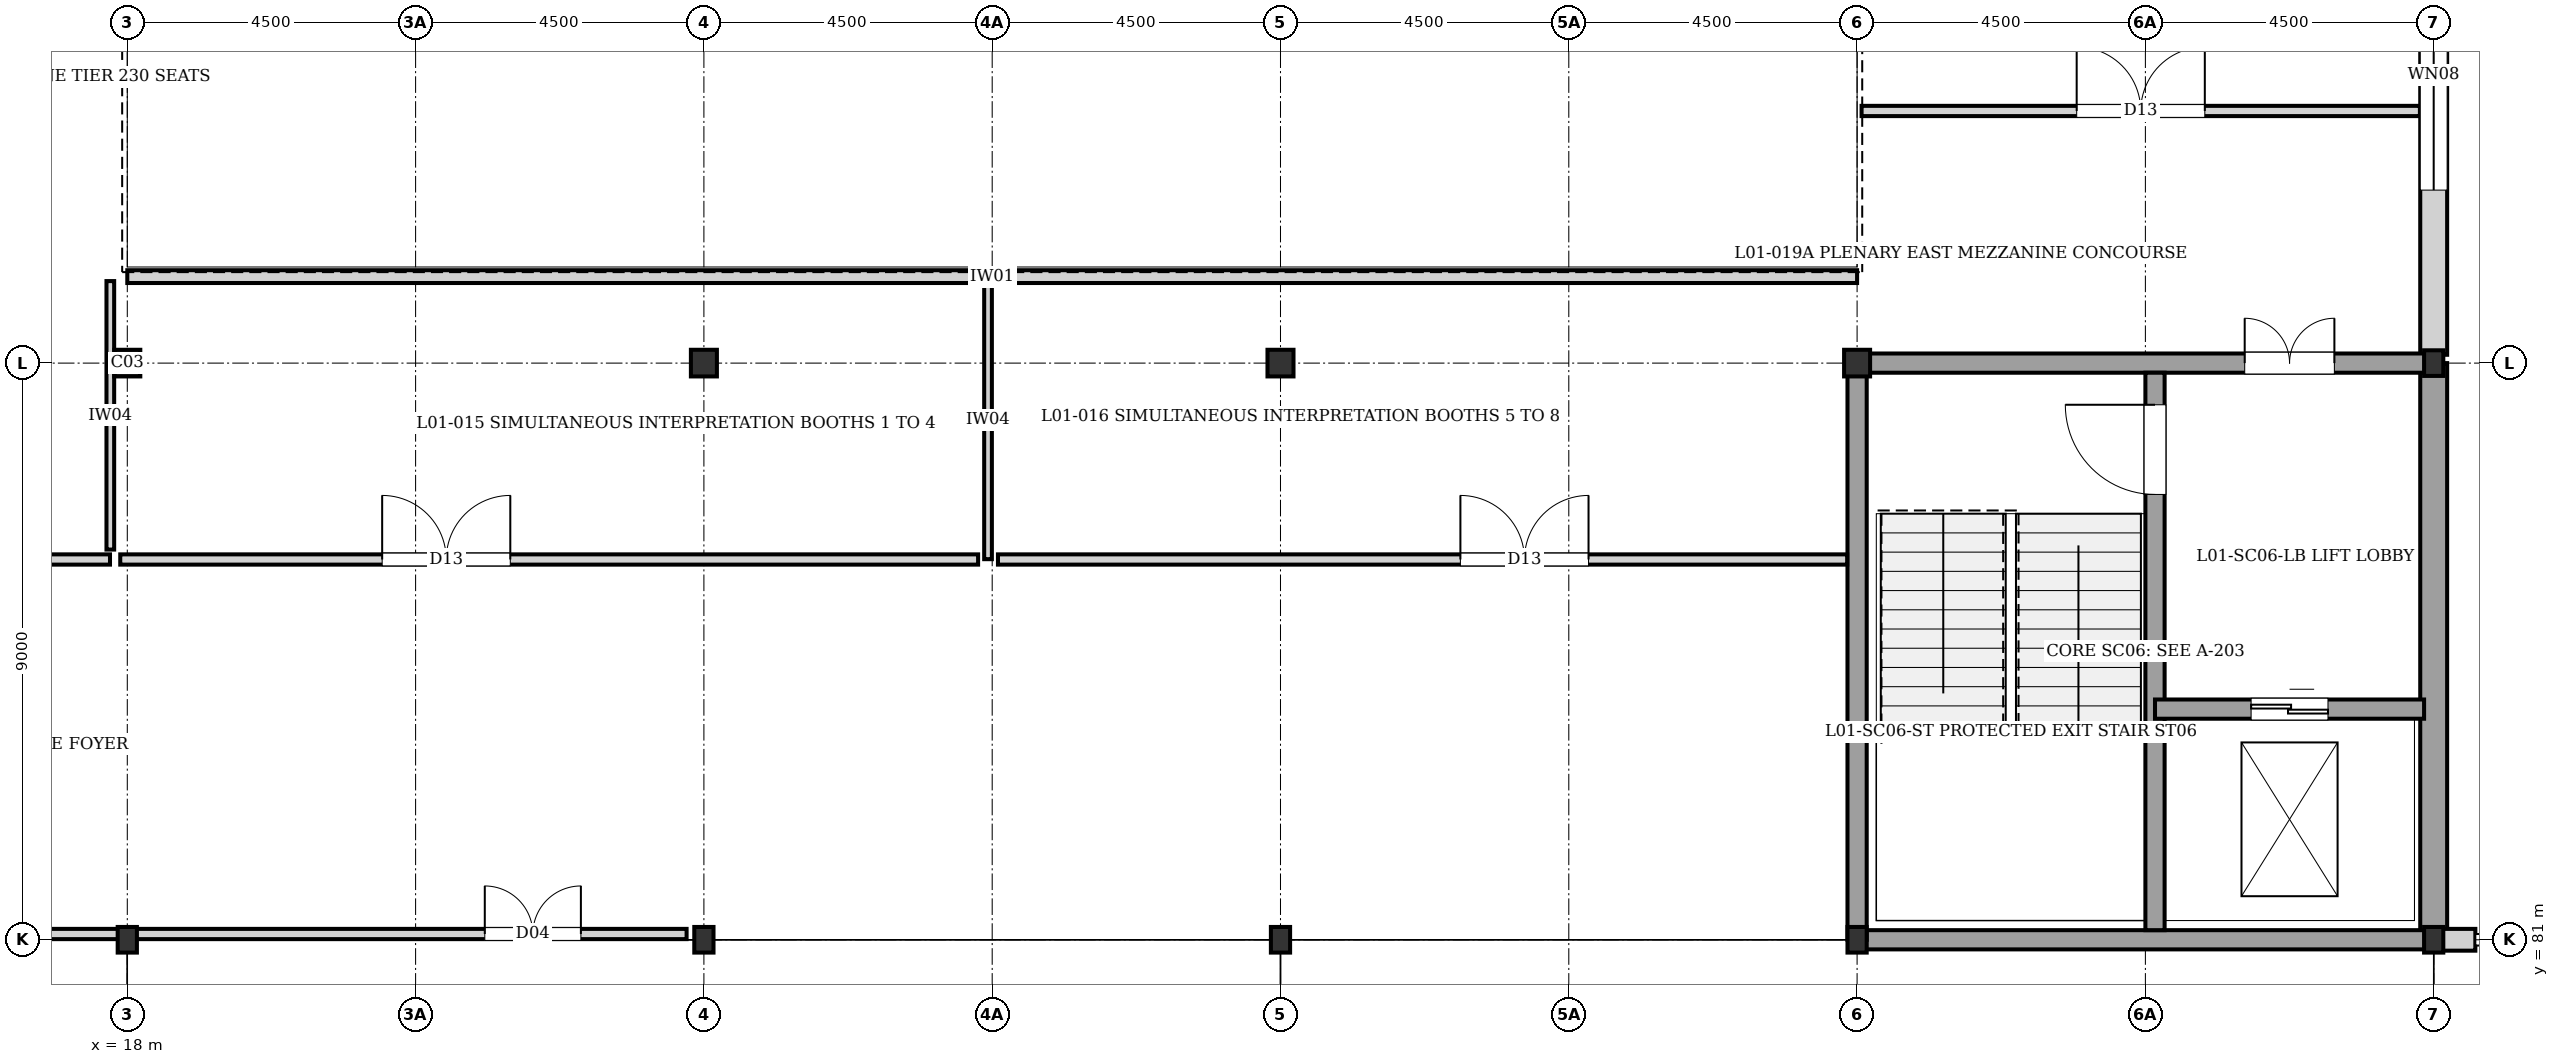
"""IFC4 building model, lengths in metres.
Left out: names, types, materials, properties, quantities, classifications, styles, units other than length and angle.
Written with IfcOpenShell. Run it as: python <this file> out.ifc"""

import sys

from ifc_helpers import new_model, si_unit, direction, frame, frame_2d, origin, origin_2d, place, context, subcontext, project, spatial, rectangle, i_section, extrude, element, fill, save


model = new_model("IFC4")
c1 = context("Model", 3, precision=1e-05, world=origin(), true_north=direction((0.0, 1.0)))
c2 = subcontext(c1, "Body", "Model", "MODEL_VIEW")
j1 = project(units=[si_unit("LENGTHUNIT", "METRE"), si_unit("PLANEANGLEUNIT", "RADIAN")], contexts=[c1])
p1 = place(None, origin())
s1 = spatial("IfcSite", under=j1, at=p1, CompositionType="ELEMENT")
p2 = place(p1, origin())
s2 = spatial("IfcBuilding", under=s1, at=p2, CompositionType="ELEMENT")
p3 = place(p2, frame((0.0, 0.0, 4.32)))
s3 = spatial("IfcBuildingStorey", under=s2, at=p3, CompositionType="ELEMENT", Elevation=4.32)
p4 = place(p3, frame((18.0, 81.0, 0.0), z_axis=(0.0, 0.0, 1.0), x_axis=(1.0, 0.0, 0.0)))
e1 = element("IfcColumn", 1, at=p4, inside=s3, PredefinedType="COLUMN", context=c2, shape_type="SweptSolid", body=[
    extrude(i_section(OverallWidth=0.3, OverallDepth=0.4, WebThickness=0.013, FlangeThickness=0.024, at=origin_2d()), origin(), (0.0, 0.0, 1.0), 3.84),
])
p5 = place(p3, frame((18.0, 90.0, 0.0), z_axis=(0.0, 0.0, 1.0), x_axis=(1.0, 0.0, 0.0)))
e2 = element("IfcColumn", 2, at=p5, inside=s3, PredefinedType="COLUMN", context=c2, shape_type="SweptSolid", body=[
    extrude(i_section(OverallWidth=0.406, OverallDepth=0.416, WebThickness=0.022, FlangeThickness=0.038, at=origin_2d()), origin(), (0.0, 0.0, 1.0), 3.84),
])
p6 = place(p3, frame((27.0, 81.0, 0.0), z_axis=(0.0, 0.0, 1.0), x_axis=(1.0, 0.0, 0.0)))
e3 = element("IfcColumn", 3, at=p6, inside=s3, PredefinedType="COLUMN", context=c2, shape_type="SweptSolid", body=[
    extrude(i_section(OverallWidth=0.3, OverallDepth=0.4, WebThickness=0.013, FlangeThickness=0.024, at=origin_2d()), origin(), (0.0, 0.0, 1.0), 3.84),
])
p7 = place(p3, frame((27.0, 90.0, 0.0), z_axis=(0.0, 0.0, 1.0), x_axis=(1.0, 0.0, 0.0)))
e4 = element("IfcColumn", 4, at=p7, inside=s3, PredefinedType="COLUMN", context=c2, shape_type="SweptSolid", body=[
    extrude(i_section(OverallWidth=0.406, OverallDepth=0.416, WebThickness=0.022, FlangeThickness=0.038, at=origin_2d()), origin(), (0.0, 0.0, 1.0), 3.84),
])
p8 = place(p3, frame((36.0, 81.0, 0.0), z_axis=(0.0, 0.0, 1.0), x_axis=(1.0, 0.0, 0.0)))
e5 = element("IfcColumn", 5, at=p8, inside=s3, PredefinedType="COLUMN", context=c2, shape_type="SweptSolid", body=[
    extrude(i_section(OverallWidth=0.3, OverallDepth=0.4, WebThickness=0.013, FlangeThickness=0.024, at=origin_2d()), origin(), (0.0, 0.0, 1.0), 3.84),
])
p9 = place(p3, frame((36.0, 90.0, 0.0), z_axis=(0.0, 0.0, 1.0), x_axis=(1.0, 0.0, 0.0)))
e6 = element("IfcColumn", 6, at=p9, inside=s3, PredefinedType="COLUMN", context=c2, shape_type="SweptSolid", body=[
    extrude(i_section(OverallWidth=0.406, OverallDepth=0.416, WebThickness=0.022, FlangeThickness=0.038, at=origin_2d()), origin(), (0.0, 0.0, 1.0), 3.84),
])
p10 = place(p3, frame((45.0, 81.0, 0.0), z_axis=(0.0, 0.0, 1.0), x_axis=(1.0, 0.0, 0.0)))
e7 = element("IfcColumn", 7, at=p10, inside=s3, PredefinedType="COLUMN", context=c2, shape_type="SweptSolid", body=[
    extrude(i_section(OverallWidth=0.3, OverallDepth=0.4, WebThickness=0.013, FlangeThickness=0.024, at=origin_2d()), origin(), (0.0, 0.0, 1.0), 3.84),
])
p11 = place(p3, frame((45.0, 90.0, 0.0), z_axis=(0.0, 0.0, 1.0), x_axis=(1.0, 0.0, 0.0)))
e8 = element("IfcColumn", 8, at=p11, inside=s3, PredefinedType="COLUMN", context=c2, shape_type="SweptSolid", body=[
    extrude(i_section(OverallWidth=0.406, OverallDepth=0.416, WebThickness=0.022, FlangeThickness=0.038, at=origin_2d()), origin(), (0.0, 0.0, 1.0), 3.84),
])
for number, where, z_axis, x_axis in (
    (9, (54.0, 81.0, 0.0), (0.0, 0.0, 1.0), (1.0, 0.0, 0.0)),
    (10, (54.0, 90.0, 0.0), (0.0, 0.0, 1.0), (1.0, 0.0, 0.0)),
):
    element("IfcColumn", number, at=place(p3, frame(where, z_axis=z_axis, x_axis=x_axis)), inside=s3, PredefinedType="COLUMN", context=c2, shape_type="SweptSolid", body=[
        extrude(i_section(OverallWidth=0.3, OverallDepth=0.4, WebThickness=0.013, FlangeThickness=0.024, at=origin_2d()), origin(), (0.0, 0.0, 1.0), 3.84),
    ])
p12 = place(p3, frame((54.0, 99.0, 0.0), z_axis=(0.0, 0.0, 1.0), x_axis=(0.0, -1.0, 0.0)))
e11 = element("IfcWall", 11, at=p12, inside=s3, PredefinedType="SOLIDWALL", context=c2, shape_type="SweptSolid", body=[
    extrude(rectangle(XDim=8.87, YDim=0.42, at=frame_2d((4.435, 0.0))), origin(), (0.0, 0.0, 1.0), 3.22),
])
p13 = place(p12, frame((2.7, 0.0, 0.4)))
e12 = element("IfcOpeningElement", 12, at=p13, cuts=e11, PredefinedType="OPENING", context=c2, shape_type="SweptSolid", body=[
    extrude(rectangle(XDim=3.6, YDim=2.2, at=frame_2d((1.8, 1.1))), frame((0.0, 0.22, 0.0), z_axis=(0.0, -1.0, 0.0), x_axis=(1.0, 0.0, 0.0)), (0.0, 0.0, 1.0), 0.44),
])
p14 = place(p3, frame((54.0, 90.0, 0.0), z_axis=(0.0, 0.0, 1.0), x_axis=(0.0, -1.0, 0.0)))
e13 = element("IfcWall", 13, at=p14, inside=s3, PredefinedType="SOLIDWALL", context=c2, shape_type="SweptSolid", body=[
    extrude(rectangle(XDim=9.0, YDim=0.42, at=frame_2d((4.5, 0.0))), origin(), (0.0, 0.0, 1.0), 3.6),
])
p15 = place(p3, frame((54.13, 81.0, 0.0), z_axis=(0.0, 0.0, 1.0), x_axis=(1.0, 0.0, 0.0)))
e14 = element("IfcWall", 14, at=p15, inside=s3, PredefinedType="SOLIDWALL", context=c2, shape_type="SweptSolid", body=[
    extrude(rectangle(XDim=0.52, YDim=0.34, at=frame_2d((0.26, 0.0))), origin(), (0.0, 0.0, 1.0), 3.28),
])
p16 = place(p3, frame((45.0, 81.0, 0.0), z_axis=(0.0, 0.0, 1.0), x_axis=(1.0, 0.0, 0.0)))
e15 = element("IfcWall", 15, at=p16, inside=s3, PredefinedType="SHEAR", context=c2, shape_type="SweptSolid", body=[
    extrude(rectangle(XDim=9.0, YDim=0.3, at=frame_2d((4.5, 0.0))), origin(), (0.0, 0.0, 1.0), 3.6),
])
p17 = place(p3, frame((45.0, 90.0, 0.0), z_axis=(0.0, 0.0, 1.0), x_axis=(1.0, 0.0, 0.0)))
e16 = element("IfcWall", 16, at=p17, inside=s3, PredefinedType="SHEAR", context=c2, shape_type="SweptSolid", body=[
    extrude(rectangle(XDim=9.0, YDim=0.3, at=frame_2d((4.5, 0.0))), origin(), (0.0, 0.0, 1.0), 3.6),
])
p18 = place(p17, frame((6.05, 0.0, 0.0)))
e17 = element("IfcOpeningElement", 17, at=p18, cuts=e16, PredefinedType="OPENING", context=c2, shape_type="SweptSolid", body=[
    extrude(rectangle(XDim=1.4, YDim=2.02, at=frame_2d((0.7, 1.01))), frame((0.0, 0.16, 0.0), z_axis=(0.0, -1.0, 0.0), x_axis=(1.0, 0.0, 0.0)), (0.0, 0.0, 1.0), 0.32),
])
p19 = place(p3, frame((45.0, 81.0, 0.0), z_axis=(0.0, 0.0, 1.0), x_axis=(0.0, 1.0, 0.0)))
e18 = element("IfcWall", 18, at=p19, inside=s3, PredefinedType="SHEAR", context=c2, shape_type="SweptSolid", body=[
    extrude(rectangle(XDim=9.0, YDim=0.3, at=frame_2d((4.5, 0.0))), origin(), (0.0, 0.0, 1.0), 3.6),
])
p20 = place(p3, frame((49.65, 81.15, 0.0), z_axis=(0.0, 0.0, 1.0), x_axis=(0.0, 1.0, 0.0)))
e19 = element("IfcWall", 19, at=p20, inside=s3, PredefinedType="SHEAR", context=c2, shape_type="SweptSolid", body=[
    extrude(rectangle(XDim=8.7, YDim=0.3, at=frame_2d((4.35, 0.0))), origin(), (0.0, 0.0, 1.0), 3.6),
])
p21 = place(p20, frame((6.8, 0.0, 0.0)))
e20 = element("IfcOpeningElement", 20, at=p21, cuts=e19, PredefinedType="OPENING", context=c2, shape_type="SweptSolid", body=[
    extrude(rectangle(XDim=1.4, YDim=2.02, at=frame_2d((0.7, 1.01))), frame((0.0, 0.16, 0.0), z_axis=(0.0, -1.0, 0.0), x_axis=(1.0, 0.0, 0.0)), (0.0, 0.0, 1.0), 0.32),
])
p22 = place(p3, frame((49.65, 84.6, 0.0), z_axis=(0.0, 0.0, 1.0), x_axis=(1.0, 0.0, 0.0)))
e21 = element("IfcWall", 21, at=p22, inside=s3, PredefinedType="SHEAR", context=c2, shape_type="SweptSolid", body=[
    extrude(rectangle(XDim=4.2, YDim=0.3, at=frame_2d((2.1, 0.0))), origin(), (0.0, 0.0, 1.0), 3.6),
])
p23 = place(p22, frame((1.5, 0.0, 0.0)))
e22 = element("IfcOpeningElement", 22, at=p23, cuts=e21, PredefinedType="OPENING", context=c2, shape_type="SweptSolid", body=[
    extrude(rectangle(XDim=1.2, YDim=2.2, at=frame_2d((0.6, 1.1))), frame((0.0, 0.16, 0.0), z_axis=(0.0, -1.0, 0.0), x_axis=(1.0, 0.0, 0.0)), (0.0, 0.0, 1.0), 0.32),
])
p24 = place(p3, frame((11.94, 86.935, 0.0), z_axis=(0.0, 0.0, 1.0), x_axis=(1.0, 0.0, 0.0)))
e23 = element("IfcWall", 23, at=p24, inside=s3, PredefinedType="PARTITIONING", context=c2, shape_type="SweptSolid", body=[
    extrude(rectangle(XDim=5.79, YDim=0.16, at=frame_2d((2.895, 0.0))), origin(), (0.0, 0.0, 1.0), 3.6),
])
p25 = place(p3, frame((17.735, 87.09, 0.0), z_axis=(0.0, 0.0, 1.0), x_axis=(0.0, 1.0, 0.0)))
e24 = element("IfcWall", 24, at=p25, inside=s3, PredefinedType="PARTITIONING", context=c2, shape_type="SweptSolid", body=[
    extrude(rectangle(XDim=4.19, YDim=0.12, at=frame_2d((2.095, 0.0))), origin(), (0.0, 0.0, 1.0), 3.6),
])
p26 = place(p3, frame((31.435, 86.94, 0.0), z_axis=(0.0, 0.0, 1.0), x_axis=(0.0, 1.0, 0.0)))
e25 = element("IfcWall", 25, at=p26, inside=s3, PredefinedType="PARTITIONING", context=c2, shape_type="SweptSolid", body=[
    extrude(rectangle(XDim=4.34, YDim=0.12, at=frame_2d((2.17, 0.0))), origin(), (0.0, 0.0, 1.0), 3.6),
])
p27 = place(p3, frame((17.89, 86.935, 0.0), z_axis=(0.0, 0.0, 1.0), x_axis=(1.0, 0.0, 0.0)))
e26 = element("IfcWall", 26, at=p27, inside=s3, PredefinedType="PARTITIONING", context=c2, shape_type="SweptSolid", body=[
    extrude(rectangle(XDim=13.39, YDim=0.16, at=frame_2d((6.695, 0.0))), origin(), (0.0, 0.0, 1.0), 3.6),
])
p28 = place(p27, frame((4.088, 0.0, 0.0)))
e27 = element("IfcOpeningElement", 27, at=p28, cuts=e26, PredefinedType="OPENING", context=c2, shape_type="SweptSolid", body=[
    extrude(rectangle(XDim=2.0, YDim=2.35, at=frame_2d((1.0, 1.175))), frame((0.0, 0.09, 0.0), z_axis=(0.0, -1.0, 0.0), x_axis=(1.0, 0.0, 0.0)), (0.0, 0.0, 1.0), 0.18),
])
p29 = place(p3, frame((31.59, 86.935, 0.0), z_axis=(0.0, 0.0, 1.0), x_axis=(1.0, 0.0, 0.0)))
e28 = element("IfcWall", 28, at=p29, inside=s3, PredefinedType="PARTITIONING", context=c2, shape_type="SweptSolid", body=[
    extrude(rectangle(XDim=13.255, YDim=0.16, at=frame_2d((6.627, 0.0))), origin(), (0.0, 0.0, 1.0), 3.6),
])
p30 = place(p29, frame((7.218, 0.0, 0.0)))
e29 = element("IfcOpeningElement", 29, at=p30, cuts=e28, PredefinedType="OPENING", context=c2, shape_type="SweptSolid", body=[
    extrude(rectangle(XDim=2.0, YDim=2.35, at=frame_2d((1.0, 1.175))), frame((0.0, 0.09, 0.0), z_axis=(0.0, -1.0, 0.0), x_axis=(1.0, 0.0, 0.0)), (0.0, 0.0, 1.0), 0.18),
])
p31 = place(p3, frame((9.155, 81.09, 0.0), z_axis=(0.0, 0.0, 1.0), x_axis=(1.0, 0.0, 0.0)))
e30 = element("IfcWall", 30, at=p31, inside=s3, PredefinedType="PARTITIONING", context=c2, shape_type="SweptSolid", body=[
    extrude(rectangle(XDim=8.825, YDim=0.16, at=frame_2d((4.413, 0.0))), origin(), (0.0, 0.0, 1.0), 3.35),
])
p32 = place(p3, frame((45.07, 93.935, 0.0), z_axis=(0.0, 0.0, 1.0), x_axis=(1.0, 0.0, 0.0)))
e31 = element("IfcWall", 31, at=p32, inside=s3, PredefinedType="PARTITIONING", context=c2, shape_type="SweptSolid", body=[
    extrude(rectangle(XDim=8.715, YDim=0.16, at=frame_2d((4.357, 0.0))), origin(), (0.0, 0.0, 1.0), 3.6),
])
p33 = place(p32, frame((3.357, 0.0, 0.0)))
e32 = element("IfcOpeningElement", 32, at=p33, cuts=e31, PredefinedType="OPENING", context=c2, shape_type="SweptSolid", body=[
    extrude(rectangle(XDim=2.0, YDim=2.35, at=frame_2d((1.0, 1.175))), frame((0.0, 0.09, 0.0), z_axis=(0.0, -1.0, 0.0), x_axis=(1.0, 0.0, 0.0)), (0.0, 0.0, 1.0), 0.18),
])
p34 = place(p3, frame((18.0, 91.35, 0.0), z_axis=(0.0, 0.0, 1.0), x_axis=(1.0, 0.0, 0.0)))
e33 = element("IfcWall", 33, at=p34, inside=s3, PredefinedType="PARTITIONING", context=c2, shape_type="SweptSolid", body=[
    extrude(rectangle(XDim=27.0, YDim=0.2, at=frame_2d((13.5, 0.0))), origin(), (0.0, 0.0, 1.0), 3.6),
])
p35 = place(p3, frame((17.98, 81.09, 0.0), z_axis=(0.0, 0.0, 1.0), x_axis=(1.0, 0.0, 0.0)))
e34 = element("IfcWall", 34, at=p35, inside=s3, PredefinedType="PARTITIONING", context=c2, shape_type="SweptSolid", body=[
    extrude(rectangle(XDim=8.75, YDim=0.16, at=frame_2d((4.375, 0.0))), origin(), (0.0, 0.0, 1.0), 3.28),
])
p36 = place(p35, frame((5.6, 0.0, 0.0)))
e35 = element("IfcOpeningElement", 35, at=p36, cuts=e34, PredefinedType="OPENING", context=c2, shape_type="SweptSolid", body=[
    extrude(rectangle(XDim=1.5, YDim=2.1, at=frame_2d((0.75, 1.05))), frame((0.0, 0.09, 0.0), z_axis=(0.0, -1.0, 0.0), x_axis=(1.0, 0.0, 0.0)), (0.0, 0.0, 1.0), 0.18),
])
p37 = place(p13, origin())
e36 = element("IfcWindow", 36, at=p37, inside=s3, PartitioningType="SINGLE_PANEL", PredefinedType="WINDOW", context=c2, shape_type="SweptSolid", body=[
    extrude(rectangle(XDim=3.6, YDim=2.2, at=frame_2d((1.8, 1.1))), frame((0.0, 0.03, 0.0), z_axis=(0.0, -1.0, 0.0), x_axis=(1.0, 0.0, 0.0)), (0.0, 0.0, 1.0), 0.06),
])
fill(e12, e36)
p38 = place(p18, origin())
e37 = element("IfcDoor", 37, at=p38, inside=s3, OperationType="DOUBLE_DOOR_SINGLE_SWING", PredefinedType="DOOR", context=c2, shape_type="SweptSolid", body=[
    extrude(rectangle(XDim=1.4, YDim=2.02, at=frame_2d((0.7, 1.01))), frame((0.0, 0.025, 0.0), z_axis=(0.0, -1.0, 0.0), x_axis=(1.0, 0.0, 0.0)), (0.0, 0.0, 1.0), 0.05),
])
fill(e17, e37)
p39 = place(p21, origin())
e38 = element("IfcDoor", 38, at=p39, inside=s3, OperationType="SINGLE_SWING_RIGHT", PredefinedType="DOOR", context=c2, shape_type="SweptSolid", body=[
    extrude(rectangle(XDim=1.4, YDim=2.02, at=frame_2d((0.7, 1.01))), frame((0.0, 0.025, 0.0), z_axis=(0.0, -1.0, 0.0), x_axis=(1.0, 0.0, 0.0)), (0.0, 0.0, 1.0), 0.05),
])
fill(e20, e38)
p40 = place(p23, origin())
e39 = element("IfcDoor", 39, at=p40, inside=s3, OperationType="DOUBLE_DOOR_SLIDING", PredefinedType="DOOR", context=c2, shape_type="SweptSolid", body=[
    extrude(rectangle(XDim=1.2, YDim=2.2, at=frame_2d((0.6, 1.1))), frame((0.0, 0.025, 0.0), z_axis=(0.0, -1.0, 0.0), x_axis=(1.0, 0.0, 0.0)), (0.0, 0.0, 1.0), 0.05),
])
fill(e22, e39)
p41 = place(p28, origin())
e40 = element("IfcDoor", 40, at=p41, inside=s3, OperationType="DOUBLE_DOOR_SINGLE_SWING", PredefinedType="DOOR", context=c2, shape_type="SweptSolid", body=[
    extrude(rectangle(XDim=2.0, YDim=2.35, at=frame_2d((1.0, 1.175))), frame((0.0, 0.025, 0.0), z_axis=(0.0, -1.0, 0.0), x_axis=(1.0, 0.0, 0.0)), (0.0, 0.0, 1.0), 0.05),
])
fill(e27, e40)
p42 = place(p30, origin())
e41 = element("IfcDoor", 41, at=p42, inside=s3, OperationType="DOUBLE_DOOR_SINGLE_SWING", PredefinedType="DOOR", context=c2, shape_type="SweptSolid", body=[
    extrude(rectangle(XDim=2.0, YDim=2.35, at=frame_2d((1.0, 1.175))), frame((0.0, 0.025, 0.0), z_axis=(0.0, -1.0, 0.0), x_axis=(1.0, 0.0, 0.0)), (0.0, 0.0, 1.0), 0.05),
])
fill(e29, e41)
p43 = place(p36, origin())
e42 = element("IfcDoor", 42, at=p43, inside=s3, OperationType="DOUBLE_DOOR_SINGLE_SWING", PredefinedType="DOOR", context=c2, shape_type="SweptSolid", body=[
    extrude(rectangle(XDim=1.5, YDim=2.1, at=frame_2d((0.75, 1.05))), frame((0.0, 0.025, 0.0), z_axis=(0.0, -1.0, 0.0), x_axis=(1.0, 0.0, 0.0)), (0.0, 0.0, 1.0), 0.05),
])
fill(e35, e42)
p44 = place(p33, origin())
e43 = element("IfcDoor", 43, at=p44, inside=s3, OperationType="DOUBLE_DOOR_SINGLE_SWING", PredefinedType="DOOR", context=c2, shape_type="SweptSolid", body=[
    extrude(rectangle(XDim=2.0, YDim=2.35, at=frame_2d((1.0, 1.175))), frame((0.0, 0.025, 0.0), z_axis=(0.0, -1.0, 0.0), x_axis=(1.0, 0.0, 0.0)), (0.0, 0.0, 1.0), 0.05),
])
fill(e32, e43)
save(model, sys.argv[1])
